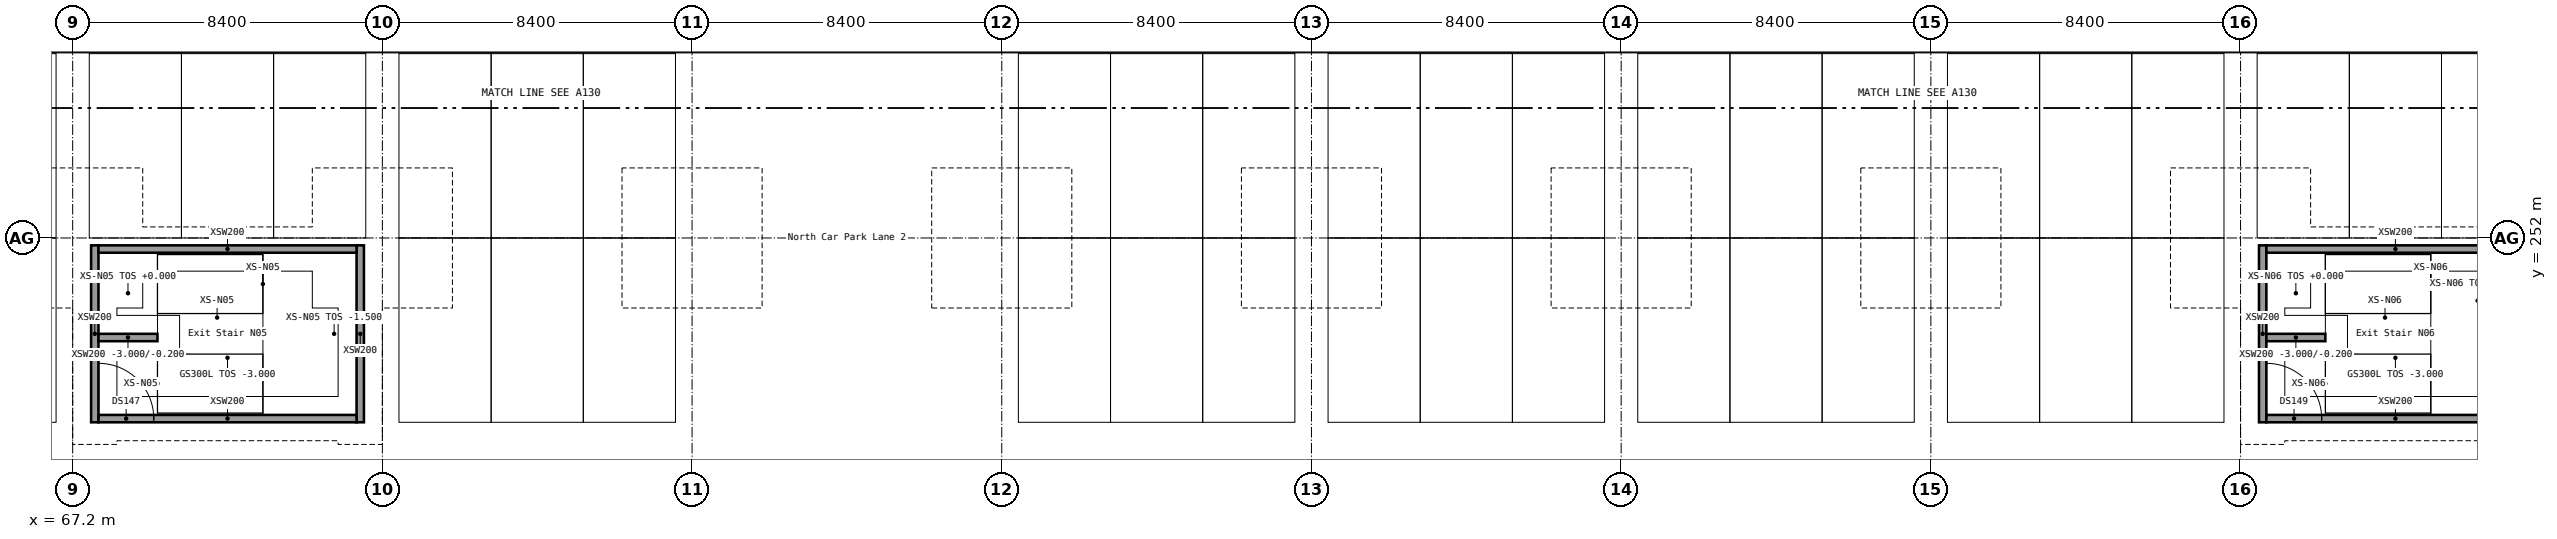
"""IFC4 building model, lengths in metres.
Left out: names, types, materials, properties, quantities, classifications, styles, units other than length and angle.
Written with IfcOpenShell. Run it as: python <this file> out.ifc"""

import sys

from ifc_helpers import new_model, si_unit, direction, frame, frame_2d, origin, origin_2d, place, context, subcontext, project, spatial, rectangle, extrude, element, fill, save


model = new_model("IFC4")
c1 = context("Model", 3, precision=1e-05, world=origin(), true_north=direction((0.0, 1.0)))
c2 = subcontext(c1, "Body", "Model", "MODEL_VIEW")
j1 = project(units=[si_unit("LENGTHUNIT", "METRE"), si_unit("PLANEANGLEUNIT", "RADIAN")], contexts=[c1])
p1 = place(None, origin())
s1 = spatial("IfcSite", under=j1, at=p1, CompositionType="ELEMENT")
p2 = place(p1, origin())
s2 = spatial("IfcBuilding", under=s1, at=p2, CompositionType="ELEMENT")
p3 = place(p2, frame((0.0, 0.0, -3.0)))
s3 = spatial("IfcBuildingStorey", under=s2, at=p3, CompositionType="ELEMENT", Elevation=-3.0)
for number, where, z_axis, x_axis in (
    (1, (67.8, 247.0, 0.0), (0.0, 0.0, 1.0), (0.0, 1.0, 0.0)),
    (2, (75.0, 247.0, 0.0), (0.0, 0.0, 1.0), (0.0, 1.0, 0.0)),
):
    element("IfcWall", number, at=place(p3, frame(where, z_axis=z_axis, x_axis=x_axis)), inside=s3, PredefinedType="SOLIDWALL", context=c2, shape_type="SweptSolid", body=[
        extrude(rectangle(XDim=4.8, YDim=0.2, at=frame_2d((2.4, 0.0))), origin(), (0.0, 0.0, 1.0), 3.0),
    ])
p4 = place(p3, frame((67.9, 247.1, 0.0), z_axis=(0.0, 0.0, 1.0), x_axis=(1.0, 0.0, 0.0)))
e3 = element("IfcWall", 3, at=p4, inside=s3, PredefinedType="SOLIDWALL", context=c2, shape_type="SweptSolid", body=[
    extrude(rectangle(XDim=7.0, YDim=0.2, at=frame_2d((3.5, 0.0))), origin(), (0.0, 0.0, 1.0), 3.0),
])
p5 = place(p4, origin())
e4 = element("IfcOpeningElement", 4, at=p5, cuts=e3, PredefinedType="OPENING", context=c2, shape_type="SweptSolid", body=[
    extrude(rectangle(XDim=1.5, YDim=2.1, at=frame_2d((0.75, 1.05))), frame((0.0, 0.1, 0.0), z_axis=(0.0, -1.0, 0.0), x_axis=(1.0, 0.0, 0.0)), (0.0, 0.0, 1.0), 0.2),
])
p6 = place(p3, frame((67.9, 251.7, 0.0), z_axis=(0.0, 0.0, 1.0), x_axis=(1.0, 0.0, 0.0)))
e5 = element("IfcWall", 5, at=p6, inside=s3, PredefinedType="SOLIDWALL", context=c2, shape_type="SweptSolid", body=[
    extrude(rectangle(XDim=7.0, YDim=0.2, at=frame_2d((3.5, 0.0))), origin(), (0.0, 0.0, 1.0), 3.0),
])
p7 = place(p3, frame((67.9, 249.3, 0.0), z_axis=(0.0, 0.0, 1.0), x_axis=(1.0, 0.0, 0.0)))
e6 = element("IfcWall", 6, at=p7, inside=s3, PredefinedType="SOLIDWALL", context=c2, shape_type="SweptSolid", body=[
    extrude(rectangle(XDim=1.6, YDim=0.2, at=frame_2d((0.8, 0.0))), origin(), (0.0, 0.0, 1.0), 2.8),
])
p8 = place(p3, frame((126.6, 247.0, 0.0), z_axis=(0.0, 0.0, 1.0), x_axis=(0.0, 1.0, 0.0)))
e7 = element("IfcWall", 7, at=p8, inside=s3, PredefinedType="SOLIDWALL", context=c2, shape_type="SweptSolid", body=[
    extrude(rectangle(XDim=4.8, YDim=0.2, at=frame_2d((2.4, 0.0))), origin(), (0.0, 0.0, 1.0), 3.0),
])
p9 = place(p3, frame((126.7, 247.1, 0.0), z_axis=(0.0, 0.0, 1.0), x_axis=(1.0, 0.0, 0.0)))
e8 = element("IfcWall", 8, at=p9, inside=s3, PredefinedType="SOLIDWALL", context=c2, shape_type="SweptSolid", body=[
    extrude(rectangle(XDim=7.0, YDim=0.2, at=frame_2d((3.5, 0.0))), origin(), (0.0, 0.0, 1.0), 3.0),
])
p10 = place(p9, origin())
e9 = element("IfcOpeningElement", 9, at=p10, cuts=e8, PredefinedType="OPENING", context=c2, shape_type="SweptSolid", body=[
    extrude(rectangle(XDim=1.5, YDim=2.1, at=frame_2d((0.75, 1.05))), frame((0.0, 0.1, 0.0), z_axis=(0.0, -1.0, 0.0), x_axis=(1.0, 0.0, 0.0)), (0.0, 0.0, 1.0), 0.2),
])
p11 = place(p3, frame((126.7, 251.7, 0.0), z_axis=(0.0, 0.0, 1.0), x_axis=(1.0, 0.0, 0.0)))
e10 = element("IfcWall", 10, at=p11, inside=s3, PredefinedType="SOLIDWALL", context=c2, shape_type="SweptSolid", body=[
    extrude(rectangle(XDim=7.0, YDim=0.2, at=frame_2d((3.5, 0.0))), origin(), (0.0, 0.0, 1.0), 3.0),
])
p12 = place(p3, frame((126.7, 249.3, 0.0), z_axis=(0.0, 0.0, 1.0), x_axis=(1.0, 0.0, 0.0)))
e11 = element("IfcWall", 11, at=p12, inside=s3, PredefinedType="SOLIDWALL", context=c2, shape_type="SweptSolid", body=[
    extrude(rectangle(XDim=1.6, YDim=0.2, at=frame_2d((0.8, 0.0))), origin(), (0.0, 0.0, 1.0), 2.8),
])
for number, where, z_axis, x_axis in (
    (12, (67.2, 252.0, 0.0), (0.0, 0.0, 1.0), (1.0, 0.0, 0.0)),
    (13, (75.6, 252.0, 0.0), (0.0, 0.0, 1.0), (1.0, 0.0, 0.0)),
    (14, (84.0, 252.0, 0.0), (0.0, 0.0, 1.0), (1.0, 0.0, 0.0)),
    (15, (92.4, 252.0, 0.0), (0.0, 0.0, 1.0), (1.0, 0.0, 0.0)),
    (16, (100.8, 252.0, 0.0), (0.0, 0.0, 1.0), (1.0, 0.0, 0.0)),
    (17, (109.2, 252.0, 0.0), (0.0, 0.0, 1.0), (1.0, 0.0, 0.0)),
    (18, (117.6, 252.0, 0.0), (0.0, 0.0, 1.0), (1.0, 0.0, 0.0)),
    (19, (126.0, 252.0, 0.0), (0.0, 0.0, 1.0), (1.0, 0.0, 0.0)),
):
    element("IfcColumn", number, at=place(p3, frame(where, z_axis=z_axis, x_axis=x_axis)), inside=s3, PredefinedType="COLUMN", context=c2, shape_type="SweptSolid", body=[
        extrude(rectangle(XDim=0.8, YDim=0.8, at=origin_2d()), origin(), (0.0, 0.0, 1.0), 2.4),
    ])
p13 = place(p5, origin())
e20 = element("IfcDoor", 20, at=p13, inside=s3, OperationType="SINGLE_SWING_LEFT", PredefinedType="DOOR", context=c2, shape_type="SweptSolid", body=[
    extrude(rectangle(XDim=1.5, YDim=2.1, at=frame_2d((0.75, 1.05))), frame((0.0, 0.025, 0.0), z_axis=(0.0, -1.0, 0.0), x_axis=(1.0, 0.0, 0.0)), (0.0, 0.0, 1.0), 0.05),
])
fill(e4, e20)
p14 = place(p10, origin())
e21 = element("IfcDoor", 21, at=p14, inside=s3, OperationType="SINGLE_SWING_LEFT", PredefinedType="DOOR", context=c2, shape_type="SweptSolid", body=[
    extrude(rectangle(XDim=1.5, YDim=2.1, at=frame_2d((0.75, 1.05))), frame((0.0, 0.025, 0.0), z_axis=(0.0, -1.0, 0.0), x_axis=(1.0, 0.0, 0.0)), (0.0, 0.0, 1.0), 0.05),
])
fill(e9, e21)
save(model, sys.argv[1])
